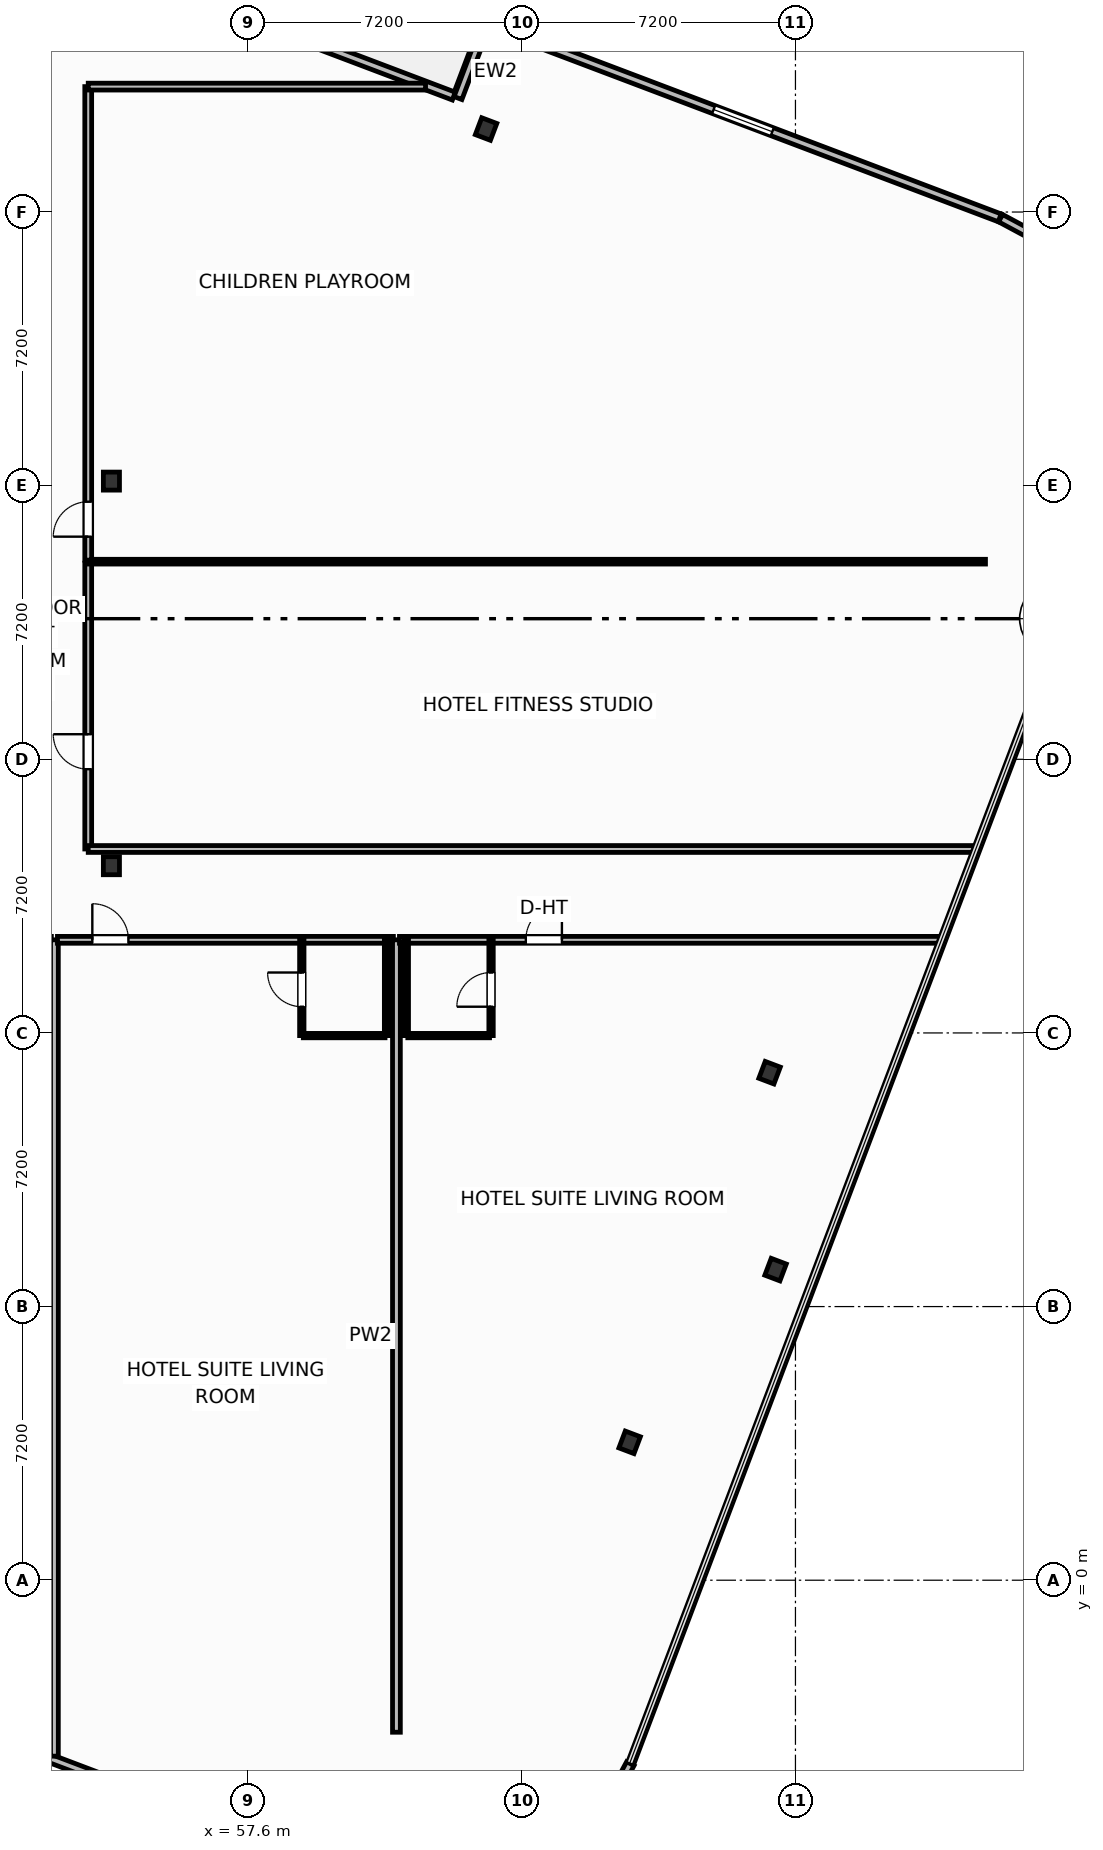
"""IFC4 building model, lengths in metres.
Left out: names, types, materials, properties, quantities, classifications, styles, units other than length and angle.
Written with IfcOpenShell. Run it as: python <this file> out.ifc"""

import sys

from ifc_helpers import new_model, si_unit, direction, frame, frame_2d, origin, origin_2d, place, context, subcontext, project, spatial, rectangle, i_section, extrude, element, fill, save


model = new_model("IFC4")
c1 = context("Model", 3, precision=1e-05, world=origin(), true_north=direction((0.0, 1.0)))
c2 = subcontext(c1, "Body", "Model", "MODEL_VIEW")
j1 = project(units=[si_unit("LENGTHUNIT", "METRE"), si_unit("PLANEANGLEUNIT", "RADIAN")], contexts=[c1])
p1 = place(None, origin())
s1 = spatial("IfcSite", under=j1, at=p1, CompositionType="ELEMENT")
p2 = place(p1, origin())
s2 = spatial("IfcBuilding", under=s1, at=p2, CompositionType="ELEMENT")
p3 = place(p2, frame((0.0, 0.0, 79.9)))
s3 = spatial("IfcBuildingStorey", under=s2, at=p3, CompositionType="ELEMENT", Elevation=79.9)
for number, where, z_axis, x_axis in (
    (1, (54.0, 18.8, 0.0), (0.0, 0.0, 1.0), (1.0, 0.0, 0.0)),
    (2, (54.0, 28.92, 0.0), (0.0, 0.0, 1.0), (1.0, 0.0, 0.0)),
    (3, (67.637, 3.628, 0.0), (0.0, 0.0, 1.0), (0.935, -0.354, 0.0)),
    (4, (71.477, 8.173, 0.0), (0.0, 0.0, 1.0), (0.935, -0.354, 0.0)),
    (5, (71.319, 13.354, 0.0), (0.0, 0.0, 1.0), (0.935, -0.354, 0.0)),
    (6, (63.859, 38.184, 0.0), (0.0, 0.0, 1.0), (0.935, -0.354, 0.0)),
):
    element("IfcColumn", number, at=place(p3, frame(where, z_axis=z_axis, x_axis=x_axis)), inside=s3, PredefinedType="COLUMN", context=c2, shape_type="SweptSolid", body=[
        extrude(i_section(OverallWidth=0.424, OverallDepth=0.474, WebThickness=0.048, FlangeThickness=0.077, FilletRadius=0.025, at=origin_2d()), origin(), (0.0, 0.0, 1.0), 3.7),
    ])
p4 = place(p3, frame((57.399, 41.175, 0.0), z_axis=(0.0, 0.0, 1.0), x_axis=(0.935227640088, -0.354046976001, 0.0)))
e7 = element("IfcWall", 7, at=p4, inside=s3, PredefinedType="SOLIDWALL", context=c2, shape_type="SweptSolid", body=[
    extrude(rectangle(XDim=6.0, YDim=0.22, at=frame_2d((3.0, 0.0))), origin(), (0.0, 0.0, 1.0), 2.73),
])
p5 = place(p4, frame((0.4, 0.0, 0.0)))
e8 = element("IfcOpeningElement", 8, at=p5, cuts=e7, PredefinedType="OPENING", context=c2, shape_type="SweptSolid", body=[
    extrude(rectangle(XDim=1.5, YDim=2.25, at=frame_2d((0.75, 1.125))), frame((0.0, 0.12, 0.0), z_axis=(0.0, -1.0, 0.0), x_axis=(1.0, 0.0, 0.0)), (0.0, 0.0, 1.0), 0.24),
])
p6 = place(p3, frame((47.424, -2.813, 0.0), z_axis=(0.0, 0.0, 1.0), x_axis=(0.935225962032, -0.354051408614, 0.0)))
e9 = element("IfcWall", 9, at=p6, inside=s3, PredefinedType="SOLIDWALL", context=c2, shape_type="SweptSolid", body=[
    extrude(rectangle(XDim=14.347, YDim=0.22, at=frame_2d((7.173, 0.0))), origin(), (0.0, 0.0, 1.0), 2.73),
])
p7 = place(p6, frame((6.348, 0.0, 0.8)))
e10 = element("IfcOpeningElement", 10, at=p7, cuts=e9, PredefinedType="OPENING", context=c2, shape_type="SweptSolid", body=[
    extrude(rectangle(XDim=1.65, YDim=1.65, at=frame_2d((0.825, 0.825))), frame((0.0, 0.12, 0.0), z_axis=(0.0, -1.0, 0.0), x_axis=(1.0, 0.0, 0.0)), (0.0, 0.0, 1.0), 0.24),
])
p8 = place(p3, frame((67.015, -6.019, 0.0), z_axis=(0.0, 0.0, 1.0), x_axis=(0.473077364598, 0.881020889142, 0.0)))
e11 = element("IfcWall", 11, at=p8, inside=s3, PredefinedType="SOLIDWALL", context=c2, shape_type="SweptSolid", body=[
    extrude(rectangle(XDim=1.353, YDim=0.22, at=frame_2d((0.677, 0.0))), origin(), (0.0, 0.0, 1.0), 2.73),
])
p9 = place(p3, frame((78.597, 35.194, 0.0), z_axis=(0.0, 0.0, 1.0), x_axis=(-0.880948732004, 0.473211719614, 0.0)))
e12 = element("IfcWall", 12, at=p9, inside=s3, PredefinedType="SOLIDWALL", context=c2, shape_type="SweptSolid", body=[
    extrude(rectangle(XDim=1.361, YDim=0.22, at=frame_2d((0.681, 0.0))), origin(), (0.0, 0.0, 1.0), 2.73),
])
p10 = place(p3, frame((77.375, 35.847, 0.0), z_axis=(0.0, 0.0, 1.0), x_axis=(-0.935222448475, 0.354060689526, 0.0)))
e13 = element("IfcWall", 13, at=p10, inside=s3, PredefinedType="SOLIDWALL", context=c2, shape_type="SweptSolid", body=[
    extrude(rectangle(XDim=14.447, YDim=0.22, at=frame_2d((7.224, 0.0))), origin(), (0.0, 0.0, 1.0), 2.73),
])
p11 = place(p10, frame((6.399, 0.0, 0.8)))
e14 = element("IfcOpeningElement", 14, at=p11, cuts=e13, PredefinedType="OPENING", context=c2, shape_type="SweptSolid", body=[
    extrude(rectangle(XDim=1.65, YDim=1.65, at=frame_2d((0.825, 0.825))), frame((0.0, 0.12, 0.0), z_axis=(0.0, -1.0, 0.0), x_axis=(1.0, 0.0, 0.0)), (0.0, 0.0, 1.0), 0.24),
])
p12 = place(p3, frame((63.819, 40.845, 0.0), z_axis=(0.0, 0.0, 1.0), x_axis=(-0.354128791944, -0.935196663123, 0.0)))
e15 = element("IfcWall", 15, at=p12, inside=s3, PredefinedType="SOLIDWALL", context=c2, shape_type="SweptSolid", body=[
    extrude(rectangle(XDim=1.975, YDim=0.22, at=frame_2d((0.988, 0.0))), origin(), (0.0, 0.0, 1.0), 2.73),
])
p13 = place(p3, frame((52.5, -4.63, 0.0), z_axis=(0.0, 0.0, 1.0), x_axis=(0.0, 1.0, 0.0)))
e16 = element("IfcWall", 16, at=p13, inside=s3, PredefinedType="PARTITIONING", context=c2, shape_type="SweptSolid", body=[
    extrude(rectangle(XDim=21.48, YDim=0.205, at=frame_2d((10.74, 0.0))), origin(), (0.0, 0.0, 1.0), 2.58),
])
p14 = place(p3, frame((52.58, 16.85, 0.0), z_axis=(0.0, 0.0, 1.0), x_axis=(1.0, 0.0, 0.0)))
e17 = element("IfcWall", 17, at=p14, inside=s3, PredefinedType="PARTITIONING", context=c2, shape_type="SweptSolid", body=[
    extrude(rectangle(XDim=8.84, YDim=0.18, at=frame_2d((4.42, 0.0))), origin(), (0.0, 0.0, 1.0), 2.58),
])
p15 = place(p14, frame((0.918, 0.0, 0.0)))
e18 = element("IfcOpeningElement", 18, at=p15, cuts=e17, PredefinedType="OPENING", context=c2, shape_type="SweptSolid", body=[
    extrude(rectangle(XDim=0.95, YDim=2.15, at=frame_2d((0.475, 1.075))), frame((0.0, 0.1, 0.0), z_axis=(0.0, -1.0, 0.0), x_axis=(1.0, 0.0, 0.0)), (0.0, 0.0, 1.0), 0.2),
])
p16 = place(p3, frame((59.05, 14.33, 0.0), z_axis=(0.0, 0.0, 1.0), x_axis=(1.0, 0.0, 0.0)))
e19 = element("IfcWall", 19, at=p16, inside=s3, PredefinedType="PARTITIONING", context=c2, shape_type="SweptSolid", body=[
    extrude(rectangle(XDim=2.15, YDim=0.115, at=frame_2d((1.075, 0.0))), origin(), (0.0, 0.0, 1.0), 3.45),
])
p17 = place(p3, frame((59.01, 14.33, 0.0), z_axis=(0.0, 0.0, 1.0), x_axis=(0.0, 1.0, 0.0)))
e20 = element("IfcWall", 20, at=p17, inside=s3, PredefinedType="PARTITIONING", context=c2, shape_type="SweptSolid", body=[
    extrude(rectangle(XDim=2.52, YDim=0.115, at=frame_2d((1.26, 0.0))), origin(), (0.0, 0.0, 1.0), 3.45),
])
p18 = place(p17, frame((0.76, 0.0, 0.0)))
e21 = element("IfcOpeningElement", 21, at=p18, cuts=e20, PredefinedType="OPENING", context=c2, shape_type="SweptSolid", body=[
    extrude(rectangle(XDim=0.9, YDim=2.05, at=frame_2d((0.45, 1.025))), frame((0.0, 0.067, 0.0), z_axis=(0.0, -1.0, 0.0), x_axis=(1.0, 0.0, 0.0)), (0.0, 0.0, 1.0), 0.135),
])
p19 = place(p3, frame((61.24, 14.33, 0.0), z_axis=(0.0, 0.0, 1.0), x_axis=(0.0, 1.0, 0.0)))
e22 = element("IfcWall", 22, at=p19, inside=s3, PredefinedType="PARTITIONING", context=c2, shape_type="SweptSolid", body=[
    extrude(rectangle(XDim=2.52, YDim=0.115, at=frame_2d((1.26, 0.0))), origin(), (0.0, 0.0, 1.0), 3.45),
])
p20 = place(p3, frame((61.5, -4.0, 0.0), z_axis=(0.0, 0.0, 1.0), x_axis=(0.0, 1.0, 0.0)))
e23 = element("IfcWall", 23, at=p20, inside=s3, PredefinedType="PARTITIONING", context=c2, shape_type="SweptSolid", body=[
    extrude(rectangle(XDim=20.85, YDim=0.205, at=frame_2d((10.425, 0.0))), origin(), (0.0, 0.0, 1.0), 3.45),
])
p21 = place(p3, frame((61.58, 16.85, 0.0), z_axis=(0.0, 0.0, 1.0), x_axis=(1.0, 0.0, 0.0)))
e24 = element("IfcWall", 24, at=p21, inside=s3, PredefinedType="PARTITIONING", context=c2, shape_type="SweptSolid", body=[
    extrude(rectangle(XDim=14.222, YDim=0.18, at=frame_2d((7.111, 0.0))), origin(), (0.0, 0.0, 1.0), 3.45),
])
p22 = place(p21, frame((3.325, 0.0, 0.0)))
e25 = element("IfcOpeningElement", 25, at=p22, cuts=e24, PredefinedType="OPENING", context=c2, shape_type="SweptSolid", body=[
    extrude(rectangle(XDim=0.95, YDim=2.15, at=frame_2d((0.475, 1.075))), frame((0.0, 0.1, 0.0), z_axis=(0.0, -1.0, 0.0), x_axis=(1.0, 0.0, 0.0)), (0.0, 0.0, 1.0), 0.2),
])
p23 = place(p3, frame((61.8, 14.33, 0.0), z_axis=(0.0, 0.0, 1.0), x_axis=(1.0, 0.0, 0.0)))
e26 = element("IfcWall", 26, at=p23, inside=s3, PredefinedType="PARTITIONING", context=c2, shape_type="SweptSolid", body=[
    extrude(rectangle(XDim=2.15, YDim=0.115, at=frame_2d((1.075, 0.0))), origin(), (0.0, 0.0, 1.0), 3.45),
])
p24 = place(p3, frame((63.99, 14.33, 0.0), z_axis=(0.0, 0.0, 1.0), x_axis=(0.0, 1.0, 0.0)))
e27 = element("IfcWall", 27, at=p24, inside=s3, PredefinedType="PARTITIONING", context=c2, shape_type="SweptSolid", body=[
    extrude(rectangle(XDim=2.52, YDim=0.115, at=frame_2d((1.26, 0.0))), origin(), (0.0, 0.0, 1.0), 3.45),
])
p25 = place(p24, frame((0.76, 0.0, 0.0)))
e28 = element("IfcOpeningElement", 28, at=p25, cuts=e27, PredefinedType="OPENING", context=c2, shape_type="SweptSolid", body=[
    extrude(rectangle(XDim=0.9, YDim=2.05, at=frame_2d((0.45, 1.025))), frame((0.0, 0.067, 0.0), z_axis=(0.0, -1.0, 0.0), x_axis=(1.0, 0.0, 0.0)), (0.0, 0.0, 1.0), 0.135),
])
p26 = place(p3, frame((61.76, 14.33, 0.0), z_axis=(0.0, 0.0, 1.0), x_axis=(0.0, 1.0, 0.0)))
e29 = element("IfcWall", 29, at=p26, inside=s3, PredefinedType="PARTITIONING", context=c2, shape_type="SweptSolid", body=[
    extrude(rectangle(XDim=2.52, YDim=0.115, at=frame_2d((1.26, 0.0))), origin(), (0.0, 0.0, 1.0), 3.45),
])
p27 = place(p3, frame((53.39, 19.24, 0.0), z_axis=(0.0, 0.0, 1.0), x_axis=(0.0, 1.0, 0.0)))
e30 = element("IfcWall", 30, at=p27, inside=s3, PredefinedType="PARTITIONING", context=c2, shape_type="SweptSolid", body=[
    extrude(rectangle(XDim=7.52, YDim=0.18, at=frame_2d((3.76, 0.0))), origin(), (0.0, 0.0, 1.0), 3.45),
])
p28 = place(p27, frame((2.1, 0.0, 0.0)))
e31 = element("IfcOpeningElement", 31, at=p28, cuts=e30, PredefinedType="OPENING", context=c2, shape_type="SweptSolid", body=[
    extrude(rectangle(XDim=0.92, YDim=2.05, at=frame_2d((0.46, 1.025))), frame((0.0, 0.1, 0.0), z_axis=(0.0, -1.0, 0.0), x_axis=(1.0, 0.0, 0.0)), (0.0, 0.0, 1.0), 0.2),
])
p29 = place(p3, frame((53.39, 26.8, 0.0), z_axis=(0.0, 0.0, 1.0), x_axis=(1.0, 0.0, 0.0)))
e32 = element("IfcWall", 32, at=p29, inside=s3, PredefinedType="PARTITIONING", context=c2, shape_type="SweptSolid", body=[
    extrude(rectangle(XDim=23.61, YDim=0.125, at=frame_2d((11.805, 0.0))), origin(), (0.0, 0.0, 1.0), 3.45),
])
p30 = place(p3, frame((53.39, 19.24, 0.0), z_axis=(0.0, 0.0, 1.0), x_axis=(1.0, 0.0, 0.0)))
e33 = element("IfcWall", 33, at=p30, inside=s3, PredefinedType="PARTITIONING", context=c2, shape_type="SweptSolid", body=[
    extrude(rectangle(XDim=23.317, YDim=0.18, at=frame_2d((11.658, 0.0))), origin(), (0.0, 0.0, 1.0), 3.45),
])
p31 = place(p3, frame((53.39, 26.84, 0.0), z_axis=(0.0, 0.0, 1.0), x_axis=(0.0, 1.0, 0.0)))
e34 = element("IfcWall", 34, at=p31, inside=s3, PredefinedType="PARTITIONING", context=c2, shape_type="SweptSolid", body=[
    extrude(rectangle(XDim=12.46, YDim=0.18, at=frame_2d((6.23, 0.0))), origin(), (0.0, 0.0, 1.0), 3.45),
])
p32 = place(p31, frame((0.618, 0.0, 0.0)))
e35 = element("IfcOpeningElement", 35, at=p32, cuts=e34, PredefinedType="OPENING", context=c2, shape_type="SweptSolid", body=[
    extrude(rectangle(XDim=0.92, YDim=2.05, at=frame_2d((0.46, 1.025))), frame((0.0, 0.1, 0.0), z_axis=(0.0, -1.0, 0.0), x_axis=(1.0, 0.0, 0.0)), (0.0, 0.0, 1.0), 0.2),
])
p33 = place(p3, frame((53.39, 39.3, 0.0), z_axis=(0.0, 0.0, 1.0), x_axis=(1.0, 0.0, 0.0)))
e36 = element("IfcWall", 36, at=p33, inside=s3, PredefinedType="PARTITIONING", context=c2, shape_type="SweptSolid", body=[
    extrude(rectangle(XDim=8.876, YDim=0.18, at=frame_2d((4.438, 0.0))), origin(), (0.0, 0.0, 1.0), 3.45),
])
p34 = place(p11, origin())
e37 = element("IfcWindow", 37, at=p34, inside=s3, PartitioningType="SINGLE_PANEL", PredefinedType="WINDOW", context=c2, shape_type="SweptSolid", body=[
    extrude(rectangle(XDim=1.65, YDim=1.65, at=frame_2d((0.825, 0.825))), frame((0.0, 0.03, 0.0), z_axis=(0.0, -1.0, 0.0), x_axis=(1.0, 0.0, 0.0)), (0.0, 0.0, 1.0), 0.06),
])
fill(e14, e37)
p35 = place(p15, origin())
e38 = element("IfcDoor", 38, at=p35, inside=s3, OperationType="SINGLE_SWING_LEFT", PredefinedType="DOOR", context=c2, shape_type="SweptSolid", body=[
    extrude(rectangle(XDim=0.95, YDim=2.15, at=frame_2d((0.475, 1.075))), frame((0.0, 0.025, 0.0), z_axis=(0.0, -1.0, 0.0), x_axis=(1.0, 0.0, 0.0)), (0.0, 0.0, 1.0), 0.05),
])
fill(e18, e38)
p36 = place(p18, origin())
e39 = element("IfcDoor", 39, at=p36, inside=s3, OperationType="SINGLE_SWING_RIGHT", PredefinedType="DOOR", context=c2, shape_type="SweptSolid", body=[
    extrude(rectangle(XDim=0.9, YDim=2.05, at=frame_2d((0.45, 1.025))), frame((0.0, 0.025, 0.0), z_axis=(0.0, -1.0, 0.0), x_axis=(1.0, 0.0, 0.0)), (0.0, 0.0, 1.0), 0.05),
])
fill(e21, e39)
p37 = place(p22, origin())
e40 = element("IfcDoor", 40, at=p37, inside=s3, OperationType="SINGLE_SWING_RIGHT", PredefinedType="DOOR", context=c2, shape_type="SweptSolid", body=[
    extrude(rectangle(XDim=0.95, YDim=2.15, at=frame_2d((0.475, 1.075))), frame((0.0, 0.025, 0.0), z_axis=(0.0, -1.0, 0.0), x_axis=(1.0, 0.0, 0.0)), (0.0, 0.0, 1.0), 0.05),
])
fill(e25, e40)
p38 = place(p25, origin())
e41 = element("IfcDoor", 41, at=p38, inside=s3, OperationType="SINGLE_SWING_LEFT", PredefinedType="DOOR", context=c2, shape_type="SweptSolid", body=[
    extrude(rectangle(XDim=0.9, YDim=2.05, at=frame_2d((0.45, 1.025))), frame((0.0, 0.025, 0.0), z_axis=(0.0, -1.0, 0.0), x_axis=(1.0, 0.0, 0.0)), (0.0, 0.0, 1.0), 0.05),
])
fill(e28, e41)
p39 = place(p28, origin())
e42 = element("IfcDoor", 42, at=p39, inside=s3, OperationType="SINGLE_SWING_RIGHT", PredefinedType="DOOR", context=c2, shape_type="SweptSolid", body=[
    extrude(rectangle(XDim=0.92, YDim=2.05, at=frame_2d((0.46, 1.025))), frame((0.0, 0.025, 0.0), z_axis=(0.0, -1.0, 0.0), x_axis=(1.0, 0.0, 0.0)), (0.0, 0.0, 1.0), 0.05),
])
fill(e31, e42)
p40 = place(p32, origin())
e43 = element("IfcDoor", 43, at=p40, inside=s3, OperationType="SINGLE_SWING_LEFT", PredefinedType="DOOR", context=c2, shape_type="SweptSolid", body=[
    extrude(rectangle(XDim=0.92, YDim=2.05, at=frame_2d((0.46, 1.025))), frame((0.0, 0.025, 0.0), z_axis=(0.0, -1.0, 0.0), x_axis=(1.0, 0.0, 0.0)), (0.0, 0.0, 1.0), 0.05),
])
fill(e35, e43)
save(model, sys.argv[1])
